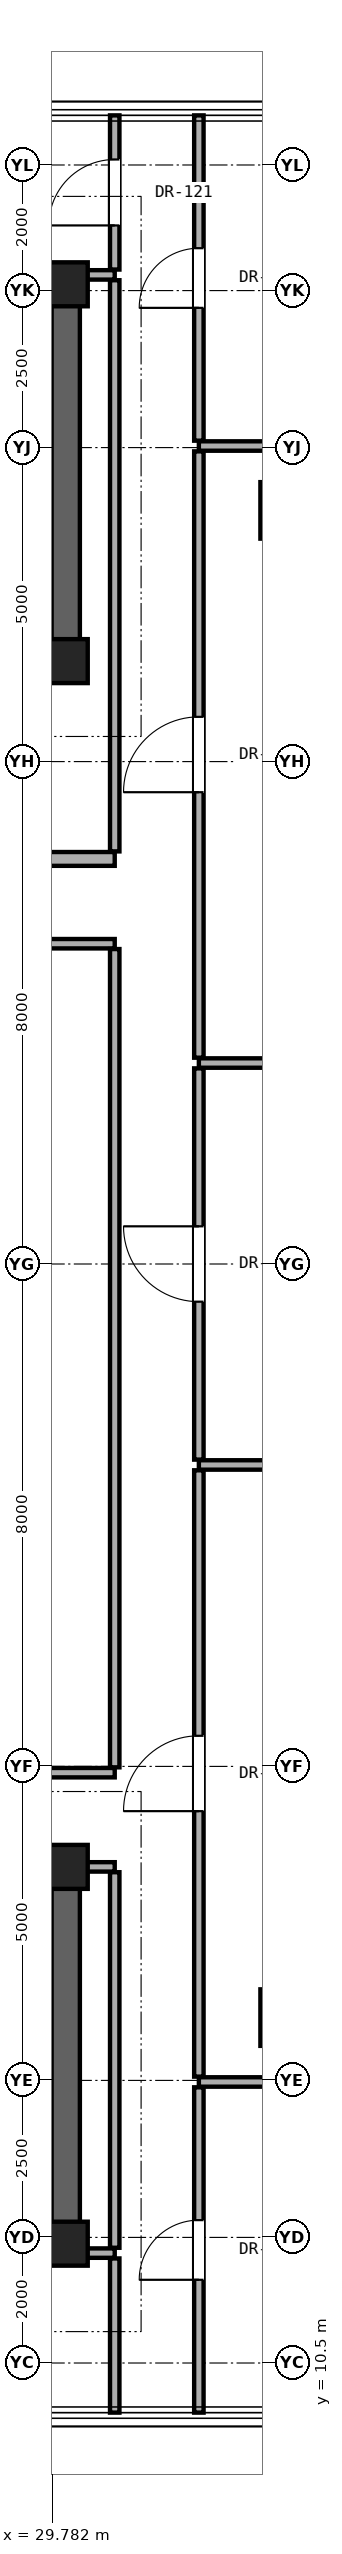
"""IFC4 building model, lengths in metres.
Left out: names, types, materials, properties, quantities, classifications, styles, units other than length and angle.
Written with IfcOpenShell. Run it as: python <this file> out.ifc"""

import sys

from ifc_helpers import new_model, si_unit, direction, frame, frame_2d, origin, origin_2d, place, context, subcontext, project, spatial, rectangle, extrude, element, fill, save


model = new_model("IFC4")
c1 = context("Model", 3, precision=1e-05, world=origin(), true_north=direction((0.0, 1.0)))
c2 = subcontext(c1, "Body", "Model", "MODEL_VIEW")
j1 = project(units=[si_unit("LENGTHUNIT", "METRE"), si_unit("PLANEANGLEUNIT", "RADIAN")], contexts=[c1])
p1 = place(None, origin())
s1 = spatial("IfcSite", under=j1, at=p1, CompositionType="ELEMENT")
p2 = place(p1, origin())
s2 = spatial("IfcBuilding", under=s1, at=p2, CompositionType="ELEMENT")
p3 = place(p2, frame((0.0, 0.0, 249.1)))
s3 = spatial("IfcBuildingStorey", under=s2, at=p3, CompositionType="ELEMENT", Elevation=249.1)
for number, where, z_axis, x_axis in (
    (1, (30.0, 12.4, 0.0), (0.0, 0.0, 1.0), (1.0, 0.0, 0.0)),
    (2, (30.0, 18.4, 0.0), (0.0, 0.0, 1.0), (1.0, 0.0, 0.0)),
    (3, (30.0, 37.6, 0.0), (0.0, 0.0, 1.0), (1.0, 0.0, 0.0)),
    (4, (30.0, 43.6, 0.0), (0.0, 0.0, 1.0), (1.0, 0.0, 0.0)),
):
    element("IfcColumn", number, at=place(p3, frame(where, z_axis=z_axis, x_axis=x_axis)), inside=s3, PredefinedType="COLUMN", context=c2, shape_type="SweptSolid", body=[
        extrude(rectangle(XDim=0.7, YDim=0.7, at=origin_2d()), origin(), (0.0, 0.0, 1.0), 3.6),
    ])
for number, where, z_axis, x_axis in (
    (5, (33.4, 16.0, 0.0), (0.0, 0.0, 1.0), (1.0, 0.0, 0.0)),
    (6, (33.4, 40.0, 0.0), (0.0, 0.0, 1.0), (1.0, 0.0, 0.0)),
):
    element("IfcColumn", number, at=place(p3, frame(where, z_axis=z_axis, x_axis=x_axis)), inside=s3, PredefinedType="PILASTER", context=c2, shape_type="SweptSolid", body=[
        extrude(rectangle(XDim=0.6, YDim=0.9, at=origin_2d()), origin(), (0.0, 0.0, 1.0), 3.6),
    ])
p4 = place(p3, frame((11.0, 43.6, 0.0), z_axis=(0.0, 0.0, 1.0), x_axis=(1.0, 0.0, 0.0)))
e7 = element("IfcWall", 7, at=p4, inside=s3, PredefinedType="SHEAR", context=c2, shape_type="SweptSolid", body=[
    extrude(rectangle(XDim=19.0, YDim=0.45, at=frame_2d((9.5, 0.0))), origin(), (0.0, 0.0, 1.0), 3.4),
])
p5 = place(p3, frame((30.0, 37.6, 0.0), z_axis=(0.0, 0.0, 1.0), x_axis=(0.0, 1.0, 0.0)))
e8 = element("IfcWall", 8, at=p5, inside=s3, PredefinedType="SHEAR", context=c2, shape_type="SweptSolid", body=[
    extrude(rectangle(XDim=6.0, YDim=0.45, at=frame_2d((3.0, 0.0))), origin(), (0.0, 0.0, 1.0), 3.4),
])
p6 = place(p3, frame((11.0, 37.6, 0.0), z_axis=(0.0, 0.0, 1.0), x_axis=(1.0, 0.0, 0.0)))
e9 = element("IfcWall", 9, at=p6, inside=s3, PredefinedType="SHEAR", context=c2, shape_type="SweptSolid", body=[
    extrude(rectangle(XDim=19.0, YDim=0.45, at=frame_2d((9.5, 0.0))), origin(), (0.0, 0.0, 1.0), 3.4),
])
p7 = place(p6, frame((1.06, 0.0, 0.0)))
e10 = element("IfcOpeningElement", 10, at=p7, cuts=e9, PredefinedType="OPENING", context=c2, shape_type="SweptSolid", body=[
    extrude(rectangle(XDim=1.15, YDim=2.2, at=frame_2d((0.575, 1.1))), frame((0.0, 0.235, 0.0), z_axis=(0.0, -1.0, 0.0), x_axis=(1.0, 0.0, 0.0)), (0.0, 0.0, 1.0), 0.47),
])
p8 = place(p6, frame((9.55, 0.0, 0.0)))
e11 = element("IfcOpeningElement", 11, at=p8, cuts=e9, PredefinedType="OPENING", context=c2, shape_type="SweptSolid", body=[
    extrude(rectangle(XDim=1.4, YDim=2.35, at=frame_2d((0.7, 1.175))), frame((0.0, 0.235, 0.0), z_axis=(0.0, -1.0, 0.0), x_axis=(1.0, 0.0, 0.0)), (0.0, 0.0, 1.0), 0.47),
])
p9 = place(p6, frame((11.95, 0.0, 0.0)))
e12 = element("IfcOpeningElement", 12, at=p9, cuts=e9, PredefinedType="OPENING", context=c2, shape_type="SweptSolid", body=[
    extrude(rectangle(XDim=1.4, YDim=2.35, at=frame_2d((0.7, 1.175))), frame((0.0, 0.235, 0.0), z_axis=(0.0, -1.0, 0.0), x_axis=(1.0, 0.0, 0.0)), (0.0, 0.0, 1.0), 0.47),
])
p10 = place(p3, frame((11.0, 12.4, 0.0), z_axis=(0.0, 0.0, 1.0), x_axis=(1.0, 0.0, 0.0)))
e13 = element("IfcWall", 13, at=p10, inside=s3, PredefinedType="SHEAR", context=c2, shape_type="SweptSolid", body=[
    extrude(rectangle(XDim=19.0, YDim=0.45, at=frame_2d((9.5, 0.0))), origin(), (0.0, 0.0, 1.0), 3.4),
])
p11 = place(p3, frame((30.0, 12.4, 0.0), z_axis=(0.0, 0.0, 1.0), x_axis=(0.0, 1.0, 0.0)))
e14 = element("IfcWall", 14, at=p11, inside=s3, PredefinedType="SHEAR", context=c2, shape_type="SweptSolid", body=[
    extrude(rectangle(XDim=6.0, YDim=0.45, at=frame_2d((3.0, 0.0))), origin(), (0.0, 0.0, 1.0), 3.4),
])
p12 = place(p3, frame((11.0, 18.4, 0.0), z_axis=(0.0, 0.0, 1.0), x_axis=(1.0, 0.0, 0.0)))
e15 = element("IfcWall", 15, at=p12, inside=s3, PredefinedType="SHEAR", context=c2, shape_type="SweptSolid", body=[
    extrude(rectangle(XDim=19.0, YDim=0.45, at=frame_2d((9.5, 0.0))), origin(), (0.0, 0.0, 1.0), 3.4),
])
p13 = place(p12, frame((4.175, 0.0, 0.0)))
e16 = element("IfcOpeningElement", 16, at=p13, cuts=e15, PredefinedType="OPENING", context=c2, shape_type="SweptSolid", body=[
    extrude(rectangle(XDim=1.2, YDim=2.25, at=frame_2d((0.6, 1.125))), frame((0.0, 0.235, 0.0), z_axis=(0.0, -1.0, 0.0), x_axis=(1.0, 0.0, 0.0)), (0.0, 0.0, 1.0), 0.47),
])
p14 = place(p12, frame((11.075, 0.0, 0.0)))
e17 = element("IfcOpeningElement", 17, at=p14, cuts=e15, PredefinedType="OPENING", context=c2, shape_type="SweptSolid", body=[
    extrude(rectangle(XDim=0.95, YDim=2.15, at=frame_2d((0.475, 1.075))), frame((0.0, 0.235, 0.0), z_axis=(0.0, -1.0, 0.0), x_axis=(1.0, 0.0, 0.0)), (0.0, 0.0, 1.0), 0.47),
])
p15 = place(p12, frame((14.3, 0.0, 0.0)))
e18 = element("IfcOpeningElement", 18, at=p15, cuts=e15, PredefinedType="OPENING", context=c2, shape_type="SweptSolid", body=[
    extrude(rectangle(XDim=1.3, YDim=2.3, at=frame_2d((0.65, 1.15))), frame((0.0, 0.235, 0.0), z_axis=(0.0, -1.0, 0.0), x_axis=(1.0, 0.0, 0.0)), (0.0, 0.0, 1.0), 0.47),
])
p16 = place(p12, frame((16.6, 0.0, 0.0)))
e19 = element("IfcOpeningElement", 19, at=p16, cuts=e15, PredefinedType="OPENING", context=c2, shape_type="SweptSolid", body=[
    extrude(rectangle(XDim=1.3, YDim=2.3, at=frame_2d((0.65, 1.15))), frame((0.0, 0.235, 0.0), z_axis=(0.0, -1.0, 0.0), x_axis=(1.0, 0.0, 0.0)), (0.0, 0.0, 1.0), 0.47),
])
p17 = place(p3, frame((30.22, 12.25, 0.0), z_axis=(0.0, 0.0, 1.0), x_axis=(1.0, 0.0, 0.0)))
e20 = element("IfcWall", 20, at=p17, inside=s3, PredefinedType="PARTITIONING", context=c2, shape_type="SweptSolid", body=[
    extrude(rectangle(XDim=0.56, YDim=0.15, at=frame_2d((0.28, 0.0))), origin(), (0.0, 0.0, 1.0), 3.4),
])
p18 = place(p3, frame((32.12, 14.975, 0.0), z_axis=(0.0, 0.0, 1.0), x_axis=(1.0, 0.0, 0.0)))
e21 = element("IfcWall", 21, at=p18, inside=s3, PredefinedType="PARTITIONING", context=c2, shape_type="SweptSolid", body=[
    extrude(rectangle(XDim=2.925, YDim=0.15, at=frame_2d((1.462, 0.0))), origin(), (0.0, 0.0, 1.0), 3.4),
])
p19 = place(p3, frame((30.22, 18.4, 0.0), z_axis=(0.0, 0.0, 1.0), x_axis=(1.0, 0.0, 0.0)))
e22 = element("IfcWall", 22, at=p19, inside=s3, PredefinedType="PARTITIONING", context=c2, shape_type="SweptSolid", body=[
    extrude(rectangle(XDim=0.56, YDim=0.15, at=frame_2d((0.28, 0.0))), origin(), (0.0, 0.0, 1.0), 2.792),
])
p20 = place(p3, frame((10.22, 19.9, 0.0), z_axis=(0.0, 0.0, 1.0), x_axis=(1.0, 0.0, 0.0)))
e23 = element("IfcWall", 23, at=p20, inside=s3, PredefinedType="PARTITIONING", context=c2, shape_type="SweptSolid", body=[
    extrude(rectangle(XDim=20.56, YDim=0.15, at=frame_2d((10.28, 0.0))), origin(), (0.0, 0.0, 1.0), 2.536),
])
p21 = place(p20, frame((1.36, 0.0, 0.0)))
e24 = element("IfcOpeningElement", 24, at=p21, cuts=e23, PredefinedType="OPENING", context=c2, shape_type="SweptSolid", body=[
    extrude(rectangle(XDim=0.9, YDim=2.1, at=frame_2d((0.45, 1.05))), frame((0.0, 0.085, 0.0), z_axis=(0.0, -1.0, 0.0), x_axis=(1.0, 0.0, 0.0)), (0.0, 0.0, 1.0), 0.17),
])
p22 = place(p20, frame((4.015, 0.0, 0.0)))
e25 = element("IfcOpeningElement", 25, at=p22, cuts=e23, PredefinedType="OPENING", context=c2, shape_type="SweptSolid", body=[
    extrude(rectangle(XDim=0.95, YDim=2.15, at=frame_2d((0.475, 1.075))), frame((0.0, 0.085, 0.0), z_axis=(0.0, -1.0, 0.0), x_axis=(1.0, 0.0, 0.0)), (0.0, 0.0, 1.0), 0.17),
])
p23 = place(p20, frame((7.804, 0.0, 0.0)))
e26 = element("IfcOpeningElement", 26, at=p23, cuts=e23, PredefinedType="OPENING", context=c2, shape_type="SweptSolid", body=[
    extrude(rectangle(XDim=1.05, YDim=2.2, at=frame_2d((0.525, 1.1))), frame((0.0, 0.085, 0.0), z_axis=(0.0, -1.0, 0.0), x_axis=(1.0, 0.0, 0.0)), (0.0, 0.0, 1.0), 0.17),
])
for number, where, z_axis, x_axis in (
    (27, (32.12, 24.8, 0.0), (0.0, 0.0, 1.0), (1.0, 0.0, 0.0)),
    (28, (32.12, 31.2, 0.0), (0.0, 0.0, 1.0), (1.0, 0.0, 0.0)),
):
    element("IfcWall", number, at=place(p3, frame(where, z_axis=z_axis, x_axis=x_axis)), inside=s3, PredefinedType="PARTITIONING", context=c2, shape_type="SweptSolid", body=[
        extrude(rectangle(XDim=8.21, YDim=0.15, at=frame_2d((4.105, 0.0))), origin(), (0.0, 0.0, 1.0), 2.619),
    ])
p24 = place(p3, frame((10.22, 33.1, 0.0), z_axis=(0.0, 0.0, 1.0), x_axis=(1.0, 0.0, 0.0)))
e29 = element("IfcWall", 29, at=p24, inside=s3, PredefinedType="PARTITIONING", context=c2, shape_type="SweptSolid", body=[
    extrude(rectangle(XDim=20.56, YDim=0.15, at=frame_2d((10.28, 0.0))), origin(), (0.0, 0.0, 1.0), 2.536),
])
p25 = place(p24, frame((12.682, 0.0, 0.0)))
e30 = element("IfcOpeningElement", 30, at=p25, cuts=e29, PredefinedType="OPENING", context=c2, shape_type="SweptSolid", body=[
    extrude(rectangle(XDim=1.05, YDim=2.2, at=frame_2d((0.525, 1.1))), frame((0.0, 0.085, 0.0), z_axis=(0.0, -1.0, 0.0), x_axis=(1.0, 0.0, 0.0)), (0.0, 0.0, 1.0), 0.17),
])
p26 = place(p24, frame((17.613, 0.0, 0.0)))
e31 = element("IfcOpeningElement", 31, at=p26, cuts=e29, PredefinedType="OPENING", context=c2, shape_type="SweptSolid", body=[
    extrude(rectangle(XDim=1.05, YDim=2.2, at=frame_2d((0.525, 1.1))), frame((0.0, 0.085, 0.0), z_axis=(0.0, -1.0, 0.0), x_axis=(1.0, 0.0, 0.0)), (0.0, 0.0, 1.0), 0.17),
])
p27 = place(p3, frame((15.59, 34.45, 0.0), z_axis=(0.0, 0.0, 1.0), x_axis=(1.0, 0.0, 0.0)))
e32 = element("IfcWall", 32, at=p27, inside=s3, PredefinedType="SOLIDWALL", context=c2, shape_type="SweptSolid", body=[
    extrude(rectangle(XDim=15.19, YDim=0.22, at=frame_2d((7.595, 0.0))), origin(), (0.0, 0.0, 1.0), 2.536),
])
p28 = place(p27, frame((6.26, 0.0, 0.0)))
e33 = element("IfcOpeningElement", 33, at=p28, cuts=e32, PredefinedType="OPENING", context=c2, shape_type="SweptSolid", body=[
    extrude(rectangle(XDim=1.2, YDim=2.25, at=frame_2d((0.6, 1.125))), frame((0.0, 0.12, 0.0), z_axis=(0.0, -1.0, 0.0), x_axis=(1.0, 0.0, 0.0)), (0.0, 0.0, 1.0), 0.24),
])
p29 = place(p27, frame((9.96, 0.0, 0.0)))
e34 = element("IfcOpeningElement", 34, at=p29, cuts=e32, PredefinedType="OPENING", context=c2, shape_type="SweptSolid", body=[
    extrude(rectangle(XDim=0.95, YDim=2.15, at=frame_2d((0.475, 1.075))), frame((0.0, 0.12, 0.0), z_axis=(0.0, -1.0, 0.0), x_axis=(1.0, 0.0, 0.0)), (0.0, 0.0, 1.0), 0.24),
])
p30 = place(p27, frame((12.21, 0.0, 0.0)))
e35 = element("IfcOpeningElement", 35, at=p30, cuts=e32, PredefinedType="OPENING", context=c2, shape_type="SweptSolid", body=[
    extrude(rectangle(XDim=0.95, YDim=2.15, at=frame_2d((0.475, 1.075))), frame((0.0, 0.12, 0.0), z_axis=(0.0, -1.0, 0.0), x_axis=(1.0, 0.0, 0.0)), (0.0, 0.0, 1.0), 0.24),
])
p31 = place(p27, frame((0.675, 0.0, 0.0)))
e36 = element("IfcOpeningElement", 36, at=p31, cuts=e32, PredefinedType="OPENING", context=c2, shape_type="SweptSolid", body=[
    extrude(rectangle(XDim=0.85, YDim=2.01, at=frame_2d((0.425, 1.005))), frame((0.0, 0.12, 0.0), z_axis=(0.0, -1.0, 0.0), x_axis=(1.0, 0.0, 0.0)), (0.0, 0.0, 1.0), 0.24),
])
p32 = place(p27, frame((2.835, 0.0, 0.0)))
e37 = element("IfcOpeningElement", 37, at=p32, cuts=e32, PredefinedType="OPENING", context=c2, shape_type="SweptSolid", body=[
    extrude(rectangle(XDim=0.85, YDim=2.01, at=frame_2d((0.425, 1.005))), frame((0.0, 0.12, 0.0), z_axis=(0.0, -1.0, 0.0), x_axis=(1.0, 0.0, 0.0)), (0.0, 0.0, 1.0), 0.24),
])
p33 = place(p3, frame((32.12, 41.025, 0.0), z_axis=(0.0, 0.0, 1.0), x_axis=(1.0, 0.0, 0.0)))
e38 = element("IfcWall", 38, at=p33, inside=s3, PredefinedType="PARTITIONING", context=c2, shape_type="SweptSolid", body=[
    extrude(rectangle(XDim=2.925, YDim=0.15, at=frame_2d((1.462, 0.0))), origin(), (0.0, 0.0, 1.0), 3.4),
])
p34 = place(p3, frame((30.22, 43.75, 0.0), z_axis=(0.0, 0.0, 1.0), x_axis=(1.0, 0.0, 0.0)))
e39 = element("IfcWall", 39, at=p34, inside=s3, PredefinedType="PARTITIONING", context=c2, shape_type="SweptSolid", body=[
    extrude(rectangle(XDim=0.56, YDim=0.15, at=frame_2d((0.28, 0.0))), origin(), (0.0, 0.0, 1.0), 3.4),
])
p35 = place(p3, frame((30.78, 9.71, 0.0), z_axis=(0.0, 0.0, 1.0), x_axis=(0.0, 1.0, 0.0)))
e40 = element("IfcWall", 40, at=p35, inside=s3, PredefinedType="PARTITIONING", context=c2, shape_type="SweptSolid", body=[
    extrude(rectangle(XDim=2.455, YDim=0.15, at=frame_2d((1.228, 0.0))), origin(), (0.0, 0.0, 1.0), 3.4),
])
p36 = place(p3, frame((30.78, 12.335, 0.0), z_axis=(0.0, 0.0, 1.0), x_axis=(0.0, 1.0, 0.0)))
e41 = element("IfcWall", 41, at=p36, inside=s3, PredefinedType="PARTITIONING", context=c2, shape_type="SweptSolid", body=[
    extrude(rectangle(XDim=5.98, YDim=0.15, at=frame_2d((2.99, 0.0))), origin(), (0.0, 0.0, 1.0), 2.792),
])
p37 = place(p3, frame((30.78, 19.985, 0.0), z_axis=(0.0, 0.0, 1.0), x_axis=(0.0, 1.0, 0.0)))
e42 = element("IfcWall", 42, at=p37, inside=s3, PredefinedType="PARTITIONING", context=c2, shape_type="SweptSolid", body=[
    extrude(rectangle(XDim=13.03, YDim=0.15, at=frame_2d((6.515, 0.0))), origin(), (0.0, 0.0, 1.0), 2.696),
])
p38 = place(p3, frame((30.78, 34.57, 0.0), z_axis=(0.0, 0.0, 1.0), x_axis=(0.0, 1.0, 0.0)))
e43 = element("IfcWall", 43, at=p38, inside=s3, PredefinedType="PARTITIONING", context=c2, shape_type="SweptSolid", body=[
    extrude(rectangle(XDim=9.095, YDim=0.15, at=frame_2d((4.547, 0.0))), origin(), (0.0, 0.0, 1.0), 2.792),
])
p39 = place(p3, frame((30.78, 43.835, 0.0), z_axis=(0.0, 0.0, 1.0), x_axis=(0.0, 1.0, 0.0)))
e44 = element("IfcWall", 44, at=p39, inside=s3, PredefinedType="PARTITIONING", context=c2, shape_type="SweptSolid", body=[
    extrude(rectangle(XDim=2.455, YDim=0.15, at=frame_2d((1.228, 0.0))), origin(), (0.0, 0.0, 1.0), 3.4),
])
p40 = place(p39, frame((0.702, 0.0, 0.0)))
e45 = element("IfcOpeningElement", 45, at=p40, cuts=e44, PredefinedType="OPENING", context=c2, shape_type="SweptSolid", body=[
    extrude(rectangle(XDim=1.05, YDim=2.2, at=frame_2d((0.525, 1.1))), frame((0.0, 0.085, 0.0), z_axis=(0.0, -1.0, 0.0), x_axis=(1.0, 0.0, 0.0)), (0.0, 0.0, 1.0), 0.17),
])
p41 = place(p3, frame((32.12, 9.71, 0.0), z_axis=(0.0, 0.0, 1.0), x_axis=(0.0, 1.0, 0.0)))
e46 = element("IfcWall", 46, at=p41, inside=s3, PredefinedType="PARTITIONING", context=c2, shape_type="SweptSolid", body=[
    extrude(rectangle(XDim=5.18, YDim=0.15, at=frame_2d((2.59, 0.0))), origin(), (0.0, 0.0, 1.0), 3.4),
])
p42 = place(p41, frame((2.115, 0.0, 0.0)))
e47 = element("IfcOpeningElement", 47, at=p42, cuts=e46, PredefinedType="OPENING", context=c2, shape_type="SweptSolid", body=[
    extrude(rectangle(XDim=0.95, YDim=2.15, at=frame_2d((0.475, 1.075))), frame((0.0, 0.085, 0.0), z_axis=(0.0, -1.0, 0.0), x_axis=(1.0, 0.0, 0.0)), (0.0, 0.0, 1.0), 0.17),
])
p43 = place(p3, frame((32.12, 15.06, 0.0), z_axis=(0.0, 0.0, 1.0), x_axis=(0.0, 1.0, 0.0)))
e48 = element("IfcWall", 48, at=p43, inside=s3, PredefinedType="PARTITIONING", context=c2, shape_type="SweptSolid", body=[
    extrude(rectangle(XDim=9.655, YDim=0.15, at=frame_2d((4.828, 0.0))), origin(), (0.0, 0.0, 1.0), 2.696),
])
p44 = place(p43, frame((4.228, 0.0, 0.0)))
e49 = element("IfcOpeningElement", 49, at=p44, cuts=e48, PredefinedType="OPENING", context=c2, shape_type="SweptSolid", body=[
    extrude(rectangle(XDim=1.2, YDim=2.25, at=frame_2d((0.6, 1.125))), frame((0.0, 0.085, 0.0), z_axis=(0.0, -1.0, 0.0), x_axis=(1.0, 0.0, 0.0)), (0.0, 0.0, 1.0), 0.17),
])
p45 = place(p3, frame((32.12, 24.885, 0.0), z_axis=(0.0, 0.0, 1.0), x_axis=(0.0, 1.0, 0.0)))
e50 = element("IfcWall", 50, at=p45, inside=s3, PredefinedType="PARTITIONING", context=c2, shape_type="SweptSolid", body=[
    extrude(rectangle(XDim=6.23, YDim=0.15, at=frame_2d((3.115, 0.0))), origin(), (0.0, 0.0, 1.0), 2.696),
])
p46 = place(p45, frame((2.515, 0.0, 0.0)))
e51 = element("IfcOpeningElement", 51, at=p46, cuts=e50, PredefinedType="OPENING", context=c2, shape_type="SweptSolid", body=[
    extrude(rectangle(XDim=1.2, YDim=2.25, at=frame_2d((0.6, 1.125))), frame((0.0, 0.085, 0.0), z_axis=(0.0, -1.0, 0.0), x_axis=(1.0, 0.0, 0.0)), (0.0, 0.0, 1.0), 0.17),
])
p47 = place(p3, frame((32.12, 31.285, 0.0), z_axis=(0.0, 0.0, 1.0), x_axis=(0.0, 1.0, 0.0)))
e52 = element("IfcWall", 52, at=p47, inside=s3, PredefinedType="PARTITIONING", context=c2, shape_type="SweptSolid", body=[
    extrude(rectangle(XDim=9.655, YDim=0.15, at=frame_2d((4.828, 0.0))), origin(), (0.0, 0.0, 1.0), 2.696),
])
p48 = place(p47, frame((4.228, 0.0, 0.0)))
e53 = element("IfcOpeningElement", 53, at=p48, cuts=e52, PredefinedType="OPENING", context=c2, shape_type="SweptSolid", body=[
    extrude(rectangle(XDim=1.2, YDim=2.25, at=frame_2d((0.6, 1.125))), frame((0.0, 0.085, 0.0), z_axis=(0.0, -1.0, 0.0), x_axis=(1.0, 0.0, 0.0)), (0.0, 0.0, 1.0), 0.17),
])
p49 = place(p3, frame((32.12, 41.11, 0.0), z_axis=(0.0, 0.0, 1.0), x_axis=(0.0, 1.0, 0.0)))
e54 = element("IfcWall", 54, at=p49, inside=s3, PredefinedType="PARTITIONING", context=c2, shape_type="SweptSolid", body=[
    extrude(rectangle(XDim=5.18, YDim=0.15, at=frame_2d((2.59, 0.0))), origin(), (0.0, 0.0, 1.0), 3.4),
])
p50 = place(p49, frame((2.115, 0.0, 0.0)))
e55 = element("IfcOpeningElement", 55, at=p50, cuts=e54, PredefinedType="OPENING", context=c2, shape_type="SweptSolid", body=[
    extrude(rectangle(XDim=0.95, YDim=2.15, at=frame_2d((0.475, 1.075))), frame((0.0, 0.085, 0.0), z_axis=(0.0, -1.0, 0.0), x_axis=(1.0, 0.0, 0.0)), (0.0, 0.0, 1.0), 0.17),
])
p51 = place(p44, origin())
e56 = element("IfcDoor", 56, at=p51, inside=s3, OperationType="SINGLE_SWING_LEFT", PredefinedType="DOOR", context=c2, shape_type="SweptSolid", body=[
    extrude(rectangle(XDim=1.2, YDim=2.25, at=frame_2d((0.6, 1.125))), frame((0.0, 0.025, 0.0), z_axis=(0.0, -1.0, 0.0), x_axis=(1.0, 0.0, 0.0)), (0.0, 0.0, 1.0), 0.05),
])
fill(e49, e56)
p52 = place(p46, origin())
e57 = element("IfcDoor", 57, at=p52, inside=s3, OperationType="SINGLE_SWING_RIGHT", PredefinedType="DOOR", context=c2, shape_type="SweptSolid", body=[
    extrude(rectangle(XDim=1.2, YDim=2.25, at=frame_2d((0.6, 1.125))), frame((0.0, 0.025, 0.0), z_axis=(0.0, -1.0, 0.0), x_axis=(1.0, 0.0, 0.0)), (0.0, 0.0, 1.0), 0.05),
])
fill(e51, e57)
p53 = place(p48, origin())
e58 = element("IfcDoor", 58, at=p53, inside=s3, OperationType="SINGLE_SWING_LEFT", PredefinedType="DOOR", context=c2, shape_type="SweptSolid", body=[
    extrude(rectangle(XDim=1.2, YDim=2.25, at=frame_2d((0.6, 1.125))), frame((0.0, 0.025, 0.0), z_axis=(0.0, -1.0, 0.0), x_axis=(1.0, 0.0, 0.0)), (0.0, 0.0, 1.0), 0.05),
])
fill(e53, e58)
p54 = place(p42, origin())
e59 = element("IfcDoor", 59, at=p54, inside=s3, OperationType="SINGLE_SWING_LEFT", PredefinedType="DOOR", context=c2, shape_type="SweptSolid", body=[
    extrude(rectangle(XDim=0.95, YDim=2.15, at=frame_2d((0.475, 1.075))), frame((0.0, 0.025, 0.0), z_axis=(0.0, -1.0, 0.0), x_axis=(1.0, 0.0, 0.0)), (0.0, 0.0, 1.0), 0.05),
])
fill(e47, e59)
p55 = place(p40, origin())
e60 = element("IfcDoor", 60, at=p55, inside=s3, OperationType="SINGLE_SWING_LEFT", PredefinedType="DOOR", context=c2, shape_type="SweptSolid", body=[
    extrude(rectangle(XDim=1.05, YDim=2.2, at=frame_2d((0.525, 1.1))), frame((0.0, 0.025, 0.0), z_axis=(0.0, -1.0, 0.0), x_axis=(1.0, 0.0, 0.0)), (0.0, 0.0, 1.0), 0.05),
])
fill(e45, e60)
p56 = place(p50, origin())
e61 = element("IfcDoor", 61, at=p56, inside=s3, OperationType="SINGLE_SWING_LEFT", PredefinedType="DOOR", context=c2, shape_type="SweptSolid", body=[
    extrude(rectangle(XDim=0.95, YDim=2.15, at=frame_2d((0.475, 1.075))), frame((0.0, 0.025, 0.0), z_axis=(0.0, -1.0, 0.0), x_axis=(1.0, 0.0, 0.0)), (0.0, 0.0, 1.0), 0.05),
])
fill(e55, e61)
save(model, sys.argv[1])
